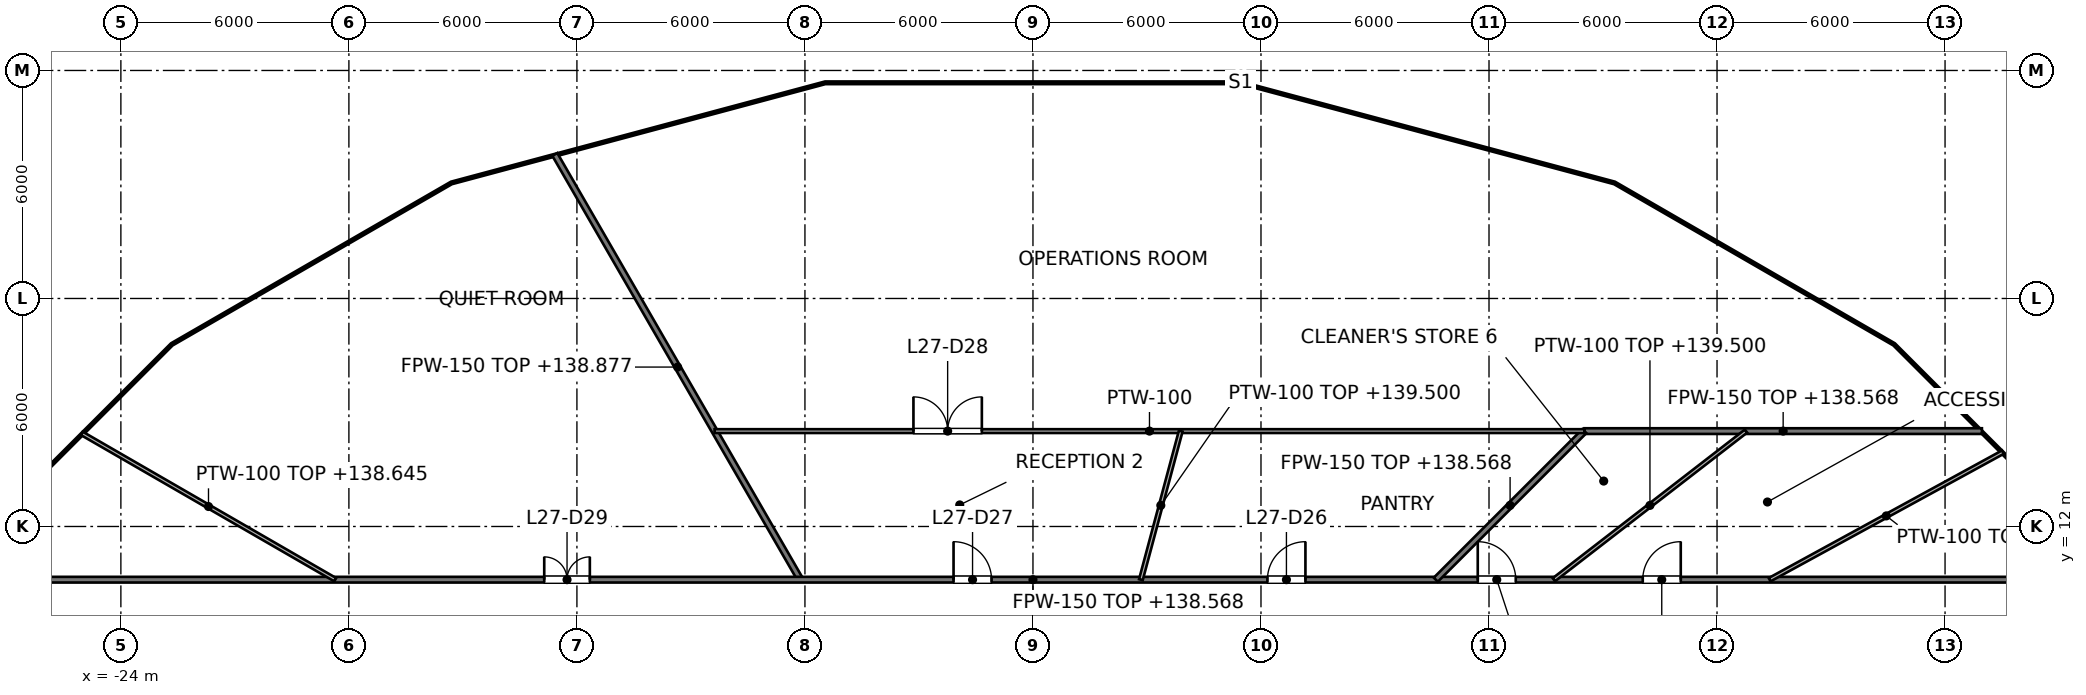
"""IFC4 building model, lengths in metres.
Left out: names, types, materials, properties, quantities, classifications, styles, units other than length and angle.
Written with IfcOpenShell. Run it as: python <this file> out.ifc"""

import sys

from ifc_helpers import new_model, si_unit, direction, frame, frame_2d, origin, place, context, subcontext, project, spatial, rectangle, extrude, element, fill, save


model = new_model("IFC4")
c1 = context("Model", 3, precision=1e-05, world=origin(), true_north=direction((0.0, 1.0)))
c2 = subcontext(c1, "Body", "Model", "MODEL_VIEW")
j1 = project(units=[si_unit("LENGTHUNIT", "METRE"), si_unit("PLANEANGLEUNIT", "RADIAN")], contexts=[c1])
p1 = place(None, origin())
s1 = spatial("IfcSite", under=j1, at=p1, CompositionType="ELEMENT")
p2 = place(p1, origin())
s2 = spatial("IfcBuilding", under=s1, at=p2, CompositionType="ELEMENT")
p3 = place(p2, frame((0.0, 0.0, 135.6)))
s3 = spatial("IfcBuildingStorey", under=s2, at=p3, CompositionType="ELEMENT", Elevation=135.6)
p4 = place(p3, frame((-12.581, 21.79, 0.0), z_axis=(0.0, 0.0, 1.0), x_axis=(0.500038653944, -0.866003085769, 0.0)))
e1 = element("IfcWall", 1, at=p4, inside=s3, PredefinedType="PARTITIONING", context=c2, shape_type="SweptSolid", body=[
    extrude(rectangle(XDim=12.921, YDim=0.15, at=frame_2d((6.461, 0.0))), origin(), (0.0, 0.0, 1.0), 3.277),
])
p5 = place(p3, frame((-25.986, 10.6, 0.0), z_axis=(0.0, 0.0, 1.0), x_axis=(1.0, 0.0, 0.0)))
e2 = element("IfcWall", 2, at=p5, inside=s3, PredefinedType="PARTITIONING", context=c2, shape_type="SweptSolid", body=[
    extrude(rectangle(XDim=51.972, YDim=0.15, at=frame_2d((25.986, 0.0))), origin(), (0.0, 0.0, 1.0), 2.968),
])
p6 = place(p5, frame((42.031, 0.0, 0.0)))
e3 = element("IfcOpeningElement", 3, at=p6, cuts=e2, PredefinedType="OPENING", context=c2, shape_type="SweptSolid", body=[
    extrude(rectangle(XDim=1.0, YDim=2.1, at=frame_2d((0.5, 1.05))), frame((0.0, 0.075, 0.0), z_axis=(0.0, -1.0, 0.0), x_axis=(1.0, 0.0, 0.0)), (0.0, 0.0, 1.0), 0.15),
])
p7 = place(p5, frame((37.69, 0.0, 0.0)))
e4 = element("IfcOpeningElement", 4, at=p7, cuts=e2, PredefinedType="OPENING", context=c2, shape_type="SweptSolid", body=[
    extrude(rectangle(XDim=1.0, YDim=2.1, at=frame_2d((0.5, 1.05))), frame((0.0, 0.075, 0.0), z_axis=(0.0, -1.0, 0.0), x_axis=(1.0, 0.0, 0.0)), (0.0, 0.0, 1.0), 0.15),
])
p8 = place(p5, frame((32.156, 0.0, 0.0)))
e5 = element("IfcOpeningElement", 5, at=p8, cuts=e2, PredefinedType="OPENING", context=c2, shape_type="SweptSolid", body=[
    extrude(rectangle(XDim=1.0, YDim=2.1, at=frame_2d((0.5, 1.05))), frame((0.0, 0.075, 0.0), z_axis=(0.0, -1.0, 0.0), x_axis=(1.0, 0.0, 0.0)), (0.0, 0.0, 1.0), 0.15),
])
p9 = place(p5, frame((23.896, 0.0, 0.0)))
e6 = element("IfcOpeningElement", 6, at=p9, cuts=e2, PredefinedType="OPENING", context=c2, shape_type="SweptSolid", body=[
    extrude(rectangle(XDim=1.0, YDim=2.1, at=frame_2d((0.5, 1.05))), frame((0.0, 0.075, 0.0), z_axis=(0.0, -1.0, 0.0), x_axis=(1.0, 0.0, 0.0)), (0.0, 0.0, 1.0), 0.15),
])
p10 = place(p5, frame((13.126, 0.0, 0.0)))
e7 = element("IfcOpeningElement", 7, at=p10, cuts=e2, PredefinedType="OPENING", context=c2, shape_type="SweptSolid", body=[
    extrude(rectangle(XDim=1.2, YDim=2.1, at=frame_2d((0.6, 1.05))), frame((0.0, 0.075, 0.0), z_axis=(0.0, -1.0, 0.0), x_axis=(1.0, 0.0, 0.0)), (0.0, 0.0, 1.0), 0.15),
])
p11 = place(p3, frame((14.51, 14.51, 0.0), z_axis=(0.0, 0.0, 1.0), x_axis=(1.0, 0.0, 0.0)))
e8 = element("IfcWall", 8, at=p11, inside=s3, PredefinedType="PARTITIONING", context=c2, shape_type="SweptSolid", body=[
    extrude(rectangle(XDim=10.46, YDim=0.15, at=frame_2d((5.23, 0.0))), origin(), (0.0, 0.0, 1.0), 2.968),
])
p12 = place(p3, frame((10.6, 10.6, 0.0), z_axis=(0.0, 0.0, 1.0), x_axis=(0.707106781187, 0.707106781187, 0.0)))
e9 = element("IfcWall", 9, at=p12, inside=s3, PredefinedType="PARTITIONING", context=c2, shape_type="SweptSolid", body=[
    extrude(rectangle(XDim=5.53, YDim=0.15, at=frame_2d((2.765, 0.0))), origin(), (0.0, 0.0, 1.0), 2.968),
])
p13 = place(p3, frame((-25.029, 14.451, 0.0), z_axis=(0.0, 0.0, 1.0), x_axis=(0.865996573404, -0.500049932359, 0.0)))
e10 = element("IfcWall", 10, at=p13, inside=s3, PredefinedType="PARTITIONING", context=c2, shape_type="SweptSolid", body=[
    extrude(rectangle(XDim=7.701, YDim=0.1, at=frame_2d((3.851, 0.0))), origin(), (0.0, 0.0, 1.0), 3.045),
])
p14 = place(p3, frame((-8.378, 14.51, 0.0), z_axis=(0.0, 0.0, 1.0), x_axis=(1.0, 0.0, 0.0)))
e11 = element("IfcWall", 11, at=p14, inside=s3, PredefinedType="PARTITIONING", context=c2, shape_type="SweptSolid", body=[
    extrude(rectangle(XDim=22.888, YDim=0.1, at=frame_2d((11.444, 0.0))), origin(), (0.0, 0.0, 1.0), 2.968),
])
p15 = place(p14, frame((5.233, 0.0, 0.0)))
e12 = element("IfcOpeningElement", 12, at=p15, cuts=e11, PredefinedType="OPENING", context=c2, shape_type="SweptSolid", body=[
    extrude(rectangle(XDim=1.8, YDim=2.1, at=frame_2d((0.9, 1.05))), frame((0.0, 0.05, 0.0), z_axis=(0.0, -1.0, 0.0), x_axis=(1.0, 0.0, 0.0)), (0.0, 0.0, 1.0), 0.1),
])
p16 = place(p3, frame((19.384, 10.6, 0.0), z_axis=(0.0, 0.0, 1.0), x_axis=(0.877388352769, 0.479780865006, 0.0)))
e13 = element("IfcWall", 13, at=p16, inside=s3, PredefinedType="PARTITIONING", context=c2, shape_type="SweptSolid", body=[
    extrude(rectangle(XDim=6.997, YDim=0.1, at=frame_2d((3.499, 0.0))), origin(), (0.0, 0.0, 1.0), 3.473),
])
p17 = place(p3, frame((13.707, 10.6, 0.0), z_axis=(0.0, 0.0, 1.0), x_axis=(0.791052244704, 0.611748597177, 0.0)))
e14 = element("IfcWall", 14, at=p17, inside=s3, PredefinedType="PARTITIONING", context=c2, shape_type="SweptSolid", body=[
    extrude(rectangle(XDim=6.391, YDim=0.1, at=frame_2d((3.196, 0.0))), origin(), (0.0, 0.0, 1.0), 3.9),
])
p18 = place(p3, frame((2.84, 10.6, 0.0), z_axis=(0.0, 0.0, 1.0), x_axis=(0.258863707653, 0.965913857888, 0.0)))
e15 = element("IfcWall", 15, at=p18, inside=s3, PredefinedType="PARTITIONING", context=c2, shape_type="SweptSolid", body=[
    extrude(rectangle(XDim=4.048, YDim=0.1, at=frame_2d((2.024, 0.0))), origin(), (0.0, 0.0, 1.0), 3.9),
])
p19 = place(p6, origin())
e16 = element("IfcDoor", 16, at=p19, inside=s3, OperationType="SINGLE_SWING_RIGHT", PredefinedType="DOOR", context=c2, shape_type="SweptSolid", body=[
    extrude(rectangle(XDim=1.0, YDim=2.1, at=frame_2d((0.5, 1.05))), frame((0.0, 0.025, 0.0), z_axis=(0.0, -1.0, 0.0), x_axis=(1.0, 0.0, 0.0)), (0.0, 0.0, 1.0), 0.05),
])
fill(e3, e16)
p20 = place(p7, origin())
e17 = element("IfcDoor", 17, at=p20, inside=s3, OperationType="SINGLE_SWING_LEFT", PredefinedType="DOOR", context=c2, shape_type="SweptSolid", body=[
    extrude(rectangle(XDim=1.0, YDim=2.1, at=frame_2d((0.5, 1.05))), frame((0.0, 0.025, 0.0), z_axis=(0.0, -1.0, 0.0), x_axis=(1.0, 0.0, 0.0)), (0.0, 0.0, 1.0), 0.05),
])
fill(e4, e17)
p21 = place(p8, origin())
e18 = element("IfcDoor", 18, at=p21, inside=s3, OperationType="SINGLE_SWING_RIGHT", PredefinedType="DOOR", context=c2, shape_type="SweptSolid", body=[
    extrude(rectangle(XDim=1.0, YDim=2.1, at=frame_2d((0.5, 1.05))), frame((0.0, 0.025, 0.0), z_axis=(0.0, -1.0, 0.0), x_axis=(1.0, 0.0, 0.0)), (0.0, 0.0, 1.0), 0.05),
])
fill(e5, e18)
p22 = place(p9, origin())
e19 = element("IfcDoor", 19, at=p22, inside=s3, OperationType="SINGLE_SWING_LEFT", PredefinedType="DOOR", context=c2, shape_type="SweptSolid", body=[
    extrude(rectangle(XDim=1.0, YDim=2.1, at=frame_2d((0.5, 1.05))), frame((0.0, 0.025, 0.0), z_axis=(0.0, -1.0, 0.0), x_axis=(1.0, 0.0, 0.0)), (0.0, 0.0, 1.0), 0.05),
])
fill(e6, e19)
p23 = place(p15, origin())
e20 = element("IfcDoor", 20, at=p23, inside=s3, OperationType="DOUBLE_DOOR_SINGLE_SWING", PredefinedType="DOOR", context=c2, shape_type="SweptSolid", body=[
    extrude(rectangle(XDim=1.8, YDim=2.1, at=frame_2d((0.9, 1.05))), frame((0.0, 0.025, 0.0), z_axis=(0.0, -1.0, 0.0), x_axis=(1.0, 0.0, 0.0)), (0.0, 0.0, 1.0), 0.05),
])
fill(e12, e20)
p24 = place(p10, origin())
e21 = element("IfcDoor", 21, at=p24, inside=s3, OperationType="DOUBLE_DOOR_SINGLE_SWING", PredefinedType="DOOR", context=c2, shape_type="SweptSolid", body=[
    extrude(rectangle(XDim=1.2, YDim=2.1, at=frame_2d((0.6, 1.05))), frame((0.0, 0.025, 0.0), z_axis=(0.0, -1.0, 0.0), x_axis=(1.0, 0.0, 0.0)), (0.0, 0.0, 1.0), 0.05),
])
fill(e7, e21)
save(model, sys.argv[1])
